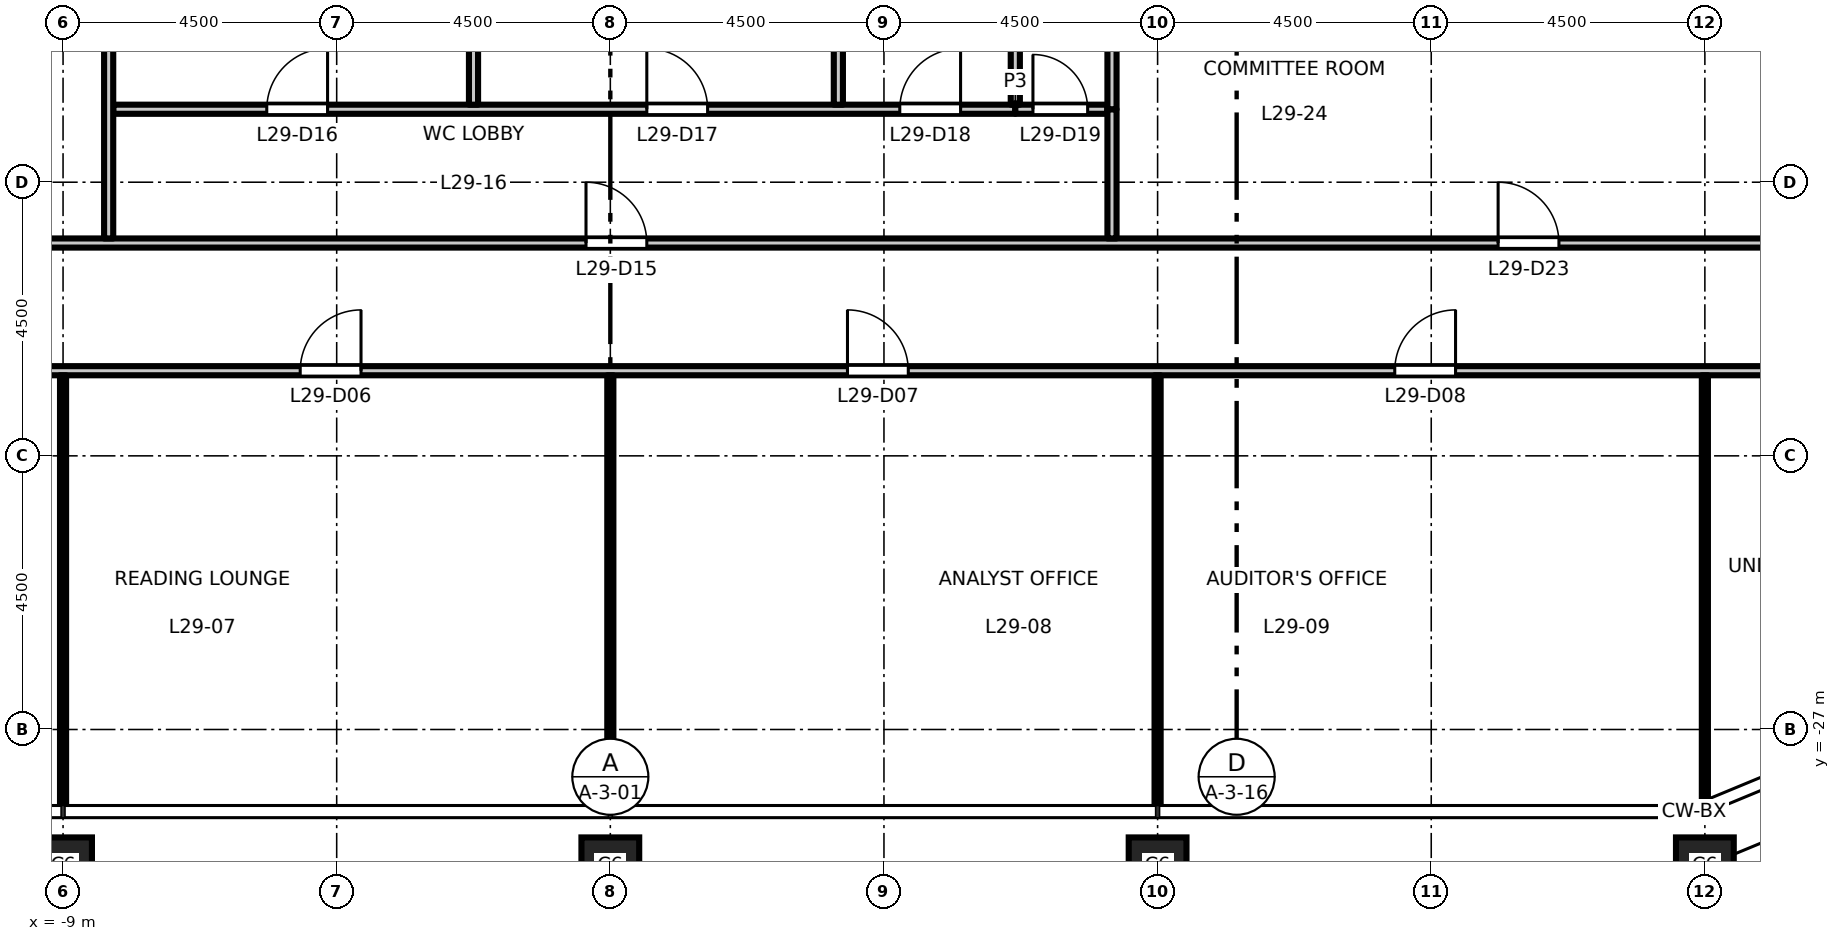
"""IFC4 building model, lengths in metres.
Left out: names, types, materials, properties, quantities, classifications, styles, units other than length and angle.
Written with IfcOpenShell. Run it as: python <this file> out.ifc"""

import sys

from ifc_helpers import new_model, si_unit, direction, frame, frame_2d, origin, origin_2d, place, context, subcontext, project, spatial, rectangle, hollow_rectangle, extrude, element, fill, save


model = new_model("IFC4")
c1 = context("Model", 3, precision=1e-05, world=origin(), true_north=direction((0.0, 1.0)))
c2 = subcontext(c1, "Body", "Model", "MODEL_VIEW")
j1 = project(units=[si_unit("LENGTHUNIT", "METRE"), si_unit("PLANEANGLEUNIT", "RADIAN")], contexts=[c1])
p1 = place(None, origin())
s1 = spatial("IfcSite", under=j1, at=p1, CompositionType="ELEMENT")
p2 = place(p1, origin())
s2 = spatial("IfcBuilding", under=s1, at=p2, CompositionType="ELEMENT")
p3 = place(p2, frame((0.0, 0.0, 136.2)))
s3 = spatial("IfcBuildingStorey", under=s2, at=p3, CompositionType="ELEMENT", Elevation=136.2)
for number, where, z_axis, x_axis in (
    (1, (-9.0, -29.25, 0.0), (0.0, 0.0, 1.0), (1.0, 0.0, 0.0)),
    (2, (0.0, -29.25, 0.0), (0.0, 0.0, 1.0), (1.0, 0.0, 0.0)),
    (3, (9.0, -29.25, 0.0), (0.0, 0.0, 1.0), (1.0, 0.0, 0.0)),
    (4, (18.0, -29.25, 0.0), (0.0, 0.0, 1.0), (1.0, 0.0, 0.0)),
):
    element("IfcColumn", number, at=place(p3, frame(where, z_axis=z_axis, x_axis=x_axis)), inside=s3, PredefinedType="COLUMN", context=c2, shape_type="SweptSolid", body=[
        extrude(hollow_rectangle(XDim=0.95, YDim=0.95, WallThickness=0.055, at=origin_2d()), origin(), (0.0, 0.0, 1.0), 4.5),
    ])
p4 = place(p3, frame((-26.894, -21.1, 0.0), z_axis=(0.0, 0.0, 1.0), x_axis=(1.0, 0.0, 0.0)))
e5 = element("IfcWall", 5, at=p4, inside=s3, PredefinedType="PARTITIONING", context=c2, shape_type="SweptSolid", body=[
    extrude(rectangle(XDim=53.788, YDim=0.15, at=frame_2d((26.894, 0.0))), origin(), (0.0, 0.0, 1.0), 4.35),
])
p5 = place(p4, frame((12.794, 0.0, 0.0)))
e6 = element("IfcOpeningElement", 6, at=p5, cuts=e5, PredefinedType="OPENING", context=c2, shape_type="SweptSolid", body=[
    extrude(rectangle(XDim=1.0, YDim=2.1, at=frame_2d((0.5, 1.05))), frame((0.0, 0.085, 0.0), z_axis=(0.0, -1.0, 0.0), x_axis=(1.0, 0.0, 0.0)), (0.0, 0.0, 1.0), 0.17),
])
p6 = place(p4, frame((21.794, 0.0, 0.0)))
e7 = element("IfcOpeningElement", 7, at=p6, cuts=e5, PredefinedType="OPENING", context=c2, shape_type="SweptSolid", body=[
    extrude(rectangle(XDim=1.0, YDim=2.1, at=frame_2d((0.5, 1.05))), frame((0.0, 0.085, 0.0), z_axis=(0.0, -1.0, 0.0), x_axis=(1.0, 0.0, 0.0)), (0.0, 0.0, 1.0), 0.17),
])
p7 = place(p4, frame((30.794, 0.0, 0.0)))
e8 = element("IfcOpeningElement", 8, at=p7, cuts=e5, PredefinedType="OPENING", context=c2, shape_type="SweptSolid", body=[
    extrude(rectangle(XDim=1.0, YDim=2.1, at=frame_2d((0.5, 1.05))), frame((0.0, 0.085, 0.0), z_axis=(0.0, -1.0, 0.0), x_axis=(1.0, 0.0, 0.0)), (0.0, 0.0, 1.0), 0.17),
])
p8 = place(p4, frame((39.794, 0.0, 0.0)))
e9 = element("IfcOpeningElement", 9, at=p8, cuts=e5, PredefinedType="OPENING", context=c2, shape_type="SweptSolid", body=[
    extrude(rectangle(XDim=1.0, YDim=2.1, at=frame_2d((0.5, 1.05))), frame((0.0, 0.085, 0.0), z_axis=(0.0, -1.0, 0.0), x_axis=(1.0, 0.0, 0.0)), (0.0, 0.0, 1.0), 0.17),
])
p9 = place(p4, frame((3.9, 0.0, 0.0)))
e10 = element("IfcOpeningElement", 10, at=p9, cuts=e5, PredefinedType="OPENING", context=c2, shape_type="SweptSolid", body=[
    extrude(rectangle(XDim=1.0, YDim=2.1, at=frame_2d((0.5, 1.05))), frame((0.0, 0.085, 0.0), z_axis=(0.0, -1.0, 0.0), x_axis=(1.0, 0.0, 0.0)), (0.0, 0.0, 1.0), 0.17),
])
p10 = place(p4, frame((48.794, 0.0, 0.0)))
e11 = element("IfcOpeningElement", 11, at=p10, cuts=e5, PredefinedType="OPENING", context=c2, shape_type="SweptSolid", body=[
    extrude(rectangle(XDim=1.0, YDim=2.1, at=frame_2d((0.5, 1.05))), frame((0.0, 0.085, 0.0), z_axis=(0.0, -1.0, 0.0), x_axis=(1.0, 0.0, 0.0)), (0.0, 0.0, 1.0), 0.17),
])
p11 = place(p3, frame((-21.825, -19.0, 0.0), z_axis=(0.0, 0.0, 1.0), x_axis=(1.0, 0.0, 0.0)))
e12 = element("IfcWall", 12, at=p11, inside=s3, PredefinedType="PARTITIONING", context=c2, shape_type="SweptSolid", body=[
    extrude(rectangle(XDim=43.65, YDim=0.15, at=frame_2d((21.825, 0.0))), origin(), (0.0, 0.0, 1.0), 4.35),
])
p12 = place(p11, frame((21.425, 0.0, 0.0)))
e13 = element("IfcOpeningElement", 13, at=p12, cuts=e12, PredefinedType="OPENING", context=c2, shape_type="SweptSolid", body=[
    extrude(rectangle(XDim=1.0, YDim=2.1, at=frame_2d((0.5, 1.05))), frame((0.0, 0.085, 0.0), z_axis=(0.0, -1.0, 0.0), x_axis=(1.0, 0.0, 0.0)), (0.0, 0.0, 1.0), 0.17),
])
p13 = place(p11, frame((6.425, 0.0, 0.0)))
e14 = element("IfcOpeningElement", 14, at=p13, cuts=e12, PredefinedType="OPENING", context=c2, shape_type="SweptSolid", body=[
    extrude(rectangle(XDim=1.0, YDim=2.1, at=frame_2d((0.5, 1.05))), frame((0.0, 0.085, 0.0), z_axis=(0.0, -1.0, 0.0), x_axis=(1.0, 0.0, 0.0)), (0.0, 0.0, 1.0), 0.17),
])
p14 = place(p11, frame((36.425, 0.0, 0.0)))
e15 = element("IfcOpeningElement", 15, at=p14, cuts=e12, PredefinedType="OPENING", context=c2, shape_type="SweptSolid", body=[
    extrude(rectangle(XDim=1.0, YDim=2.1, at=frame_2d((0.5, 1.05))), frame((0.0, 0.085, 0.0), z_axis=(0.0, -1.0, 0.0), x_axis=(1.0, 0.0, 0.0)), (0.0, 0.0, 1.0), 0.17),
])
p15 = place(p3, frame((-8.175, -16.8, 0.0), z_axis=(0.0, 0.0, 1.0), x_axis=(1.0, 0.0, 0.0)))
e16 = element("IfcWall", 16, at=p15, inside=s3, PredefinedType="PARTITIONING", context=c2, shape_type="SweptSolid", body=[
    extrude(rectangle(XDim=14.835, YDim=0.15, at=frame_2d((7.417, 0.0))), origin(), (0.0, 0.0, 1.0), 4.35),
])
p16 = place(p15, frame((2.525, 0.0, 0.0)))
e17 = element("IfcOpeningElement", 17, at=p16, cuts=e16, PredefinedType="OPENING", context=c2, shape_type="SweptSolid", body=[
    extrude(rectangle(XDim=1.0, YDim=2.1, at=frame_2d((0.5, 1.05))), frame((0.0, 0.085, 0.0), z_axis=(0.0, -1.0, 0.0), x_axis=(1.0, 0.0, 0.0)), (0.0, 0.0, 1.0), 0.17),
])
p17 = place(p15, frame((8.775, 0.0, 0.0)))
e18 = element("IfcOpeningElement", 18, at=p17, cuts=e16, PredefinedType="OPENING", context=c2, shape_type="SweptSolid", body=[
    extrude(rectangle(XDim=1.0, YDim=2.1, at=frame_2d((0.5, 1.05))), frame((0.0, 0.085, 0.0), z_axis=(0.0, -1.0, 0.0), x_axis=(1.0, 0.0, 0.0)), (0.0, 0.0, 1.0), 0.17),
])
p18 = place(p15, frame((12.935, 0.0, 0.0)))
e19 = element("IfcOpeningElement", 19, at=p18, cuts=e16, PredefinedType="OPENING", context=c2, shape_type="SweptSolid", body=[
    extrude(rectangle(XDim=1.0, YDim=2.1, at=frame_2d((0.5, 1.05))), frame((0.0, 0.085, 0.0), z_axis=(0.0, -1.0, 0.0), x_axis=(1.0, 0.0, 0.0)), (0.0, 0.0, 1.0), 0.17),
])
p19 = place(p3, frame((6.66, -16.8, 0.0), z_axis=(0.0, 0.0, 1.0), x_axis=(1.0, 0.0, 0.0)))
e20 = element("IfcWall", 20, at=p19, inside=s3, PredefinedType="PARTITIONING", context=c2, shape_type="SweptSolid", body=[
    extrude(rectangle(XDim=1.515, YDim=0.15, at=frame_2d((0.758, 0.0))), origin(), (0.0, 0.0, 1.0), 4.35),
])
p20 = place(p19, frame((0.29, 0.0, 0.0)))
e21 = element("IfcOpeningElement", 21, at=p20, cuts=e20, PredefinedType="OPENING", context=c2, shape_type="SweptSolid", body=[
    extrude(rectangle(XDim=0.9, YDim=2.1, at=frame_2d((0.45, 1.05))), frame((0.0, 0.085, 0.0), z_axis=(0.0, -1.0, 0.0), x_axis=(1.0, 0.0, 0.0)), (0.0, 0.0, 1.0), 0.17),
])
p21 = place(p3, frame((-9.0, -28.26, 0.0), z_axis=(0.0, 0.0, 1.0), x_axis=(0.0, 1.0, 0.0)))
e22 = element("IfcWall", 22, at=p21, inside=s3, PredefinedType="PARTITIONING", context=c2, shape_type="SweptSolid", body=[
    extrude(rectangle(XDim=7.085, YDim=0.1, at=frame_2d((3.542, 0.0))), origin(), (0.0, 0.0, 1.0), 3.45),
])
p22 = place(p3, frame((-8.25, -18.925, 0.0), z_axis=(0.0, 0.0, 1.0), x_axis=(0.0, 1.0, 0.0)))
e23 = element("IfcWall", 23, at=p22, inside=s3, PredefinedType="PARTITIONING", context=c2, shape_type="SweptSolid", body=[
    extrude(rectangle(XDim=5.425, YDim=0.15, at=frame_2d((2.712, 0.0))), origin(), (0.0, 0.0, 1.0), 4.35),
])
p23 = place(p3, frame((-2.25, -16.725, 0.0), z_axis=(0.0, 0.0, 1.0), x_axis=(0.0, 1.0, 0.0)))
e24 = element("IfcWall", 24, at=p23, inside=s3, PredefinedType="PARTITIONING", context=c2, shape_type="SweptSolid", body=[
    extrude(rectangle(XDim=8.355, YDim=0.15, at=frame_2d((4.177, 0.0))), origin(), (0.0, 0.0, 1.0), 4.35),
])
p24 = place(p3, frame((0.0, -28.26, 0.0), z_axis=(0.0, 0.0, 1.0), x_axis=(0.0, 1.0, 0.0)))
e25 = element("IfcWall", 25, at=p24, inside=s3, PredefinedType="PARTITIONING", context=c2, shape_type="SweptSolid", body=[
    extrude(rectangle(XDim=7.085, YDim=0.1, at=frame_2d((3.542, 0.0))), origin(), (0.0, 0.0, 1.0), 3.45),
])
p25 = place(p3, frame((3.75, -16.725, 0.0), z_axis=(0.0, 0.0, 1.0), x_axis=(0.0, 1.0, 0.0)))
e26 = element("IfcWall", 26, at=p25, inside=s3, PredefinedType="PARTITIONING", context=c2, shape_type="SweptSolid", body=[
    extrude(rectangle(XDim=8.355, YDim=0.15, at=frame_2d((4.177, 0.0))), origin(), (0.0, 0.0, 1.0), 4.35),
])
p26 = place(p3, frame((6.66, -16.725, 0.0), z_axis=(0.0, 0.0, 1.0), x_axis=(0.0, 1.0, 0.0)))
e27 = element("IfcWall", 27, at=p26, inside=s3, PredefinedType="PARTITIONING", context=c2, shape_type="SweptSolid", body=[
    extrude(rectangle(XDim=8.598, YDim=0.15, at=frame_2d((4.299, 0.0))), origin(), (0.0, 0.0, 1.0), 4.35),
])
p27 = place(p3, frame((8.25, -18.925, 0.0), z_axis=(0.0, 0.0, 1.0), x_axis=(0.0, 1.0, 0.0)))
e28 = element("IfcWall", 28, at=p27, inside=s3, PredefinedType="PARTITIONING", context=c2, shape_type="SweptSolid", body=[
    extrude(rectangle(XDim=2.125, YDim=0.15, at=frame_2d((1.062, 0.0))), origin(), (0.0, 0.0, 1.0), 4.35),
])
p28 = place(p3, frame((8.25, -16.8, 0.0), z_axis=(0.0, 0.0, 1.0), x_axis=(0.0, 1.0, 0.0)))
e29 = element("IfcWall", 29, at=p28, inside=s3, PredefinedType="PARTITIONING", context=c2, shape_type="SweptSolid", body=[
    extrude(rectangle(XDim=3.3, YDim=0.15, at=frame_2d((1.65, 0.0))), origin(), (0.0, 0.0, 1.0), 4.35),
])
p29 = place(p3, frame((9.0, -28.26, 0.0), z_axis=(0.0, 0.0, 1.0), x_axis=(0.0, 1.0, 0.0)))
e30 = element("IfcWall", 30, at=p29, inside=s3, PredefinedType="PARTITIONING", context=c2, shape_type="SweptSolid", body=[
    extrude(rectangle(XDim=7.085, YDim=0.1, at=frame_2d((3.542, 0.0))), origin(), (0.0, 0.0, 1.0), 3.45),
])
p30 = place(p3, frame((18.0, -28.178, 0.0), z_axis=(0.0, 0.0, 1.0), x_axis=(0.0, 1.0, 0.0)))
e31 = element("IfcWall", 31, at=p30, inside=s3, PredefinedType="PARTITIONING", context=c2, shape_type="SweptSolid", body=[
    extrude(rectangle(XDim=7.003, YDim=0.1, at=frame_2d((3.501, 0.0))), origin(), (0.0, 0.0, 1.0), 3.45),
])
p31 = place(p6, origin())
e32 = element("IfcDoor", 32, at=p31, inside=s3, OperationType="SINGLE_SWING_RIGHT", PredefinedType="DOOR", context=c2, shape_type="SweptSolid", body=[
    extrude(rectangle(XDim=1.0, YDim=2.1, at=frame_2d((0.5, 1.05))), frame((0.0, 0.025, 0.0), z_axis=(0.0, -1.0, 0.0), x_axis=(1.0, 0.0, 0.0)), (0.0, 0.0, 1.0), 0.05),
])
fill(e7, e32)
p32 = place(p7, origin())
e33 = element("IfcDoor", 33, at=p32, inside=s3, OperationType="SINGLE_SWING_LEFT", PredefinedType="DOOR", context=c2, shape_type="SweptSolid", body=[
    extrude(rectangle(XDim=1.0, YDim=2.1, at=frame_2d((0.5, 1.05))), frame((0.0, 0.025, 0.0), z_axis=(0.0, -1.0, 0.0), x_axis=(1.0, 0.0, 0.0)), (0.0, 0.0, 1.0), 0.05),
])
fill(e8, e33)
p33 = place(p8, origin())
e34 = element("IfcDoor", 34, at=p33, inside=s3, OperationType="SINGLE_SWING_RIGHT", PredefinedType="DOOR", context=c2, shape_type="SweptSolid", body=[
    extrude(rectangle(XDim=1.0, YDim=2.1, at=frame_2d((0.5, 1.05))), frame((0.0, 0.025, 0.0), z_axis=(0.0, -1.0, 0.0), x_axis=(1.0, 0.0, 0.0)), (0.0, 0.0, 1.0), 0.05),
])
fill(e9, e34)
p34 = place(p12, origin())
e35 = element("IfcDoor", 35, at=p34, inside=s3, OperationType="SINGLE_SWING_LEFT", PredefinedType="DOOR", context=c2, shape_type="SweptSolid", body=[
    extrude(rectangle(XDim=1.0, YDim=2.1, at=frame_2d((0.5, 1.05))), frame((0.0, 0.025, 0.0), z_axis=(0.0, -1.0, 0.0), x_axis=(1.0, 0.0, 0.0)), (0.0, 0.0, 1.0), 0.05),
])
fill(e13, e35)
p35 = place(p16, origin())
e36 = element("IfcDoor", 36, at=p35, inside=s3, OperationType="SINGLE_SWING_RIGHT", PredefinedType="DOOR", context=c2, shape_type="SweptSolid", body=[
    extrude(rectangle(XDim=1.0, YDim=2.1, at=frame_2d((0.5, 1.05))), frame((0.0, 0.025, 0.0), z_axis=(0.0, -1.0, 0.0), x_axis=(1.0, 0.0, 0.0)), (0.0, 0.0, 1.0), 0.05),
])
fill(e17, e36)
p36 = place(p17, origin())
e37 = element("IfcDoor", 37, at=p36, inside=s3, OperationType="SINGLE_SWING_LEFT", PredefinedType="DOOR", context=c2, shape_type="SweptSolid", body=[
    extrude(rectangle(XDim=1.0, YDim=2.1, at=frame_2d((0.5, 1.05))), frame((0.0, 0.025, 0.0), z_axis=(0.0, -1.0, 0.0), x_axis=(1.0, 0.0, 0.0)), (0.0, 0.0, 1.0), 0.05),
])
fill(e18, e37)
p37 = place(p18, origin())
e38 = element("IfcDoor", 38, at=p37, inside=s3, OperationType="SINGLE_SWING_RIGHT", PredefinedType="DOOR", context=c2, shape_type="SweptSolid", body=[
    extrude(rectangle(XDim=1.0, YDim=2.1, at=frame_2d((0.5, 1.05))), frame((0.0, 0.025, 0.0), z_axis=(0.0, -1.0, 0.0), x_axis=(1.0, 0.0, 0.0)), (0.0, 0.0, 1.0), 0.05),
])
fill(e19, e38)
p38 = place(p20, origin())
e39 = element("IfcDoor", 39, at=p38, inside=s3, OperationType="SINGLE_SWING_LEFT", PredefinedType="DOOR", context=c2, shape_type="SweptSolid", body=[
    extrude(rectangle(XDim=0.9, YDim=2.1, at=frame_2d((0.45, 1.05))), frame((0.0, 0.025, 0.0), z_axis=(0.0, -1.0, 0.0), x_axis=(1.0, 0.0, 0.0)), (0.0, 0.0, 1.0), 0.05),
])
fill(e21, e39)
p39 = place(p14, origin())
e40 = element("IfcDoor", 40, at=p39, inside=s3, OperationType="SINGLE_SWING_LEFT", PredefinedType="DOOR", context=c2, shape_type="SweptSolid", body=[
    extrude(rectangle(XDim=1.0, YDim=2.1, at=frame_2d((0.5, 1.05))), frame((0.0, 0.025, 0.0), z_axis=(0.0, -1.0, 0.0), x_axis=(1.0, 0.0, 0.0)), (0.0, 0.0, 1.0), 0.05),
])
fill(e15, e40)
save(model, sys.argv[1])
